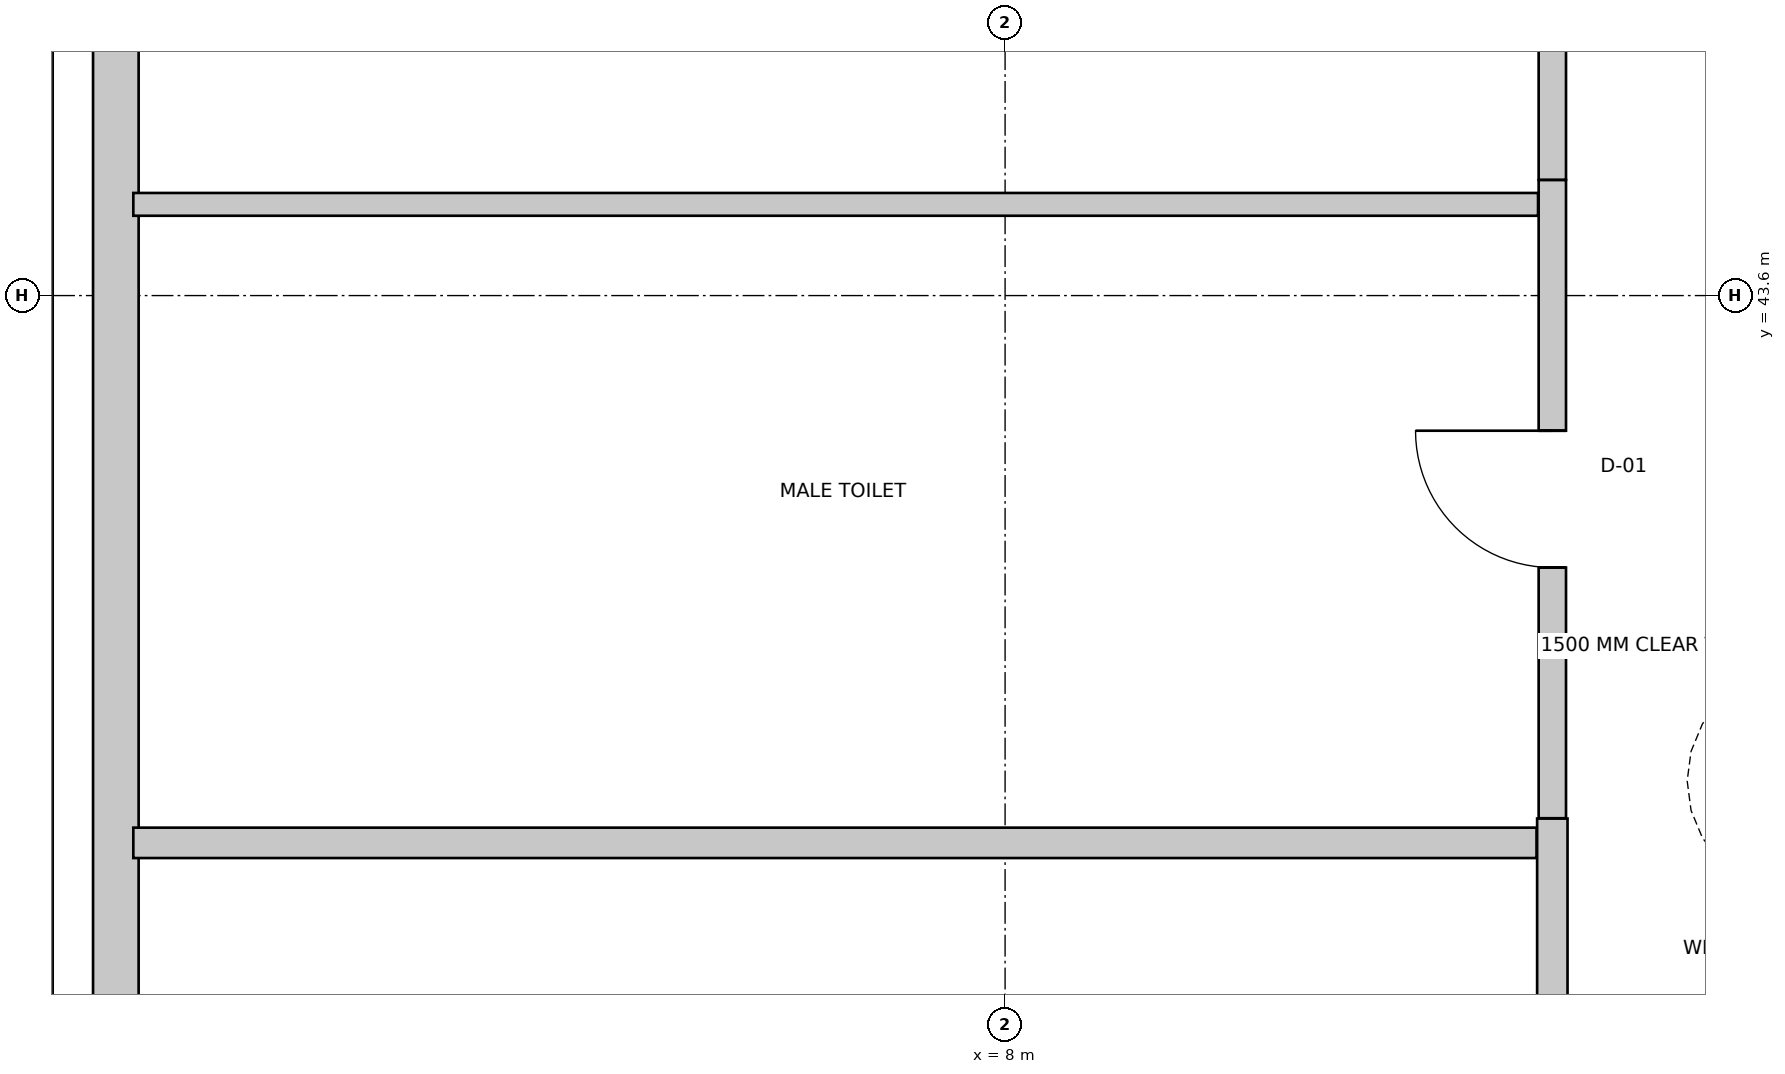
"""IFC4 building model, lengths in metres.
Left out: names, types, materials, properties, quantities, classifications, styles, units other than length and angle.
Written with IfcOpenShell. Run it as: python <this file> out.ifc"""

import sys

from ifc_helpers import new_model, si_unit, direction, frame, frame_2d, origin, place, context, subcontext, project, spatial, rectangle, extrude, source, transform, mapped, element, fill, save


model = new_model("IFC4")
c1 = context("Model", 3, precision=1e-05, world=origin(), true_north=direction((0.0, 1.0)))
c2 = subcontext(c1, "Body", "Model", "MODEL_VIEW")
j1 = project(units=[si_unit("LENGTHUNIT", "METRE"), si_unit("PLANEANGLEUNIT", "RADIAN")], contexts=[c1])
p1 = place(None, origin())
s1 = spatial("IfcSite", under=j1, at=p1, CompositionType="ELEMENT")
p2 = place(p1, origin())
s2 = spatial("IfcBuilding", under=s1, at=p2, CompositionType="ELEMENT")
p3 = place(p2, origin())
s3 = spatial("IfcBuildingStorey", under=s2, at=p3, CompositionType="ELEMENT", Elevation=0.0)
p4 = place(p3, frame((2.15, 4.112, 0.0), z_axis=(0.0, 0.0, 1.0), x_axis=(0.0, 1.0, 0.0)))
e1 = element("IfcWall", 1, at=p4, inside=s3, PredefinedType="SOLIDWALL", context=c2, shape_type="SweptSolid", body=[
    extrude(rectangle(XDim=45.431, YDim=0.3, at=frame_2d((22.715, 0.0))), origin(), (0.0, 0.0, 1.0), 5.7),
])
m1 = source(origin(), c2, "Body", "SweptSolid", [
    extrude(rectangle(XDim=2.4, YDim=2.8, at=frame_2d((1.2, 1.4))), frame((0.0, 0.16, 0.0), z_axis=(0.0, -1.0, 0.0), x_axis=(1.0, 0.0, 0.0)), (0.0, 0.0, 1.0), 0.32),
])
p5 = place(p4, frame((19.231, 0.0, 0.0)))
e2 = element("IfcOpeningElement", 2, at=p5, cuts=e1, PredefinedType="OPENING", context=c2, shape_type="MappedRepresentation", body=[
    mapped(m1, transform((0.0, 0.0, 0.0), scale=1.0)),
])
p6 = place(p4, frame((12.831, 0.0, 0.0)))
e3 = element("IfcOpeningElement", 3, at=p6, cuts=e1, PredefinedType="OPENING", context=c2, shape_type="MappedRepresentation", body=[
    mapped(m1, transform((0.0, 0.0, 0.0), scale=1.0)),
])
m2 = source(origin(), c2, "Body", "SweptSolid", [
    extrude(rectangle(XDim=1.8, YDim=2.4, at=frame_2d((0.9, 1.2))), frame((0.0, 0.16, 0.0), z_axis=(0.0, -1.0, 0.0), x_axis=(1.0, 0.0, 0.0)), (0.0, 0.0, 1.0), 0.32),
])
p7 = place(p4, frame((4.131, 0.0, 0.0)))
e4 = element("IfcOpeningElement", 4, at=p7, cuts=e1, PredefinedType="OPENING", context=c2, shape_type="MappedRepresentation", body=[
    mapped(m2, transform((0.0, 0.0, 0.0), scale=1.0)),
])
p8 = place(p3, frame((11.6, 33.444, 0.0), z_axis=(0.0, 0.0, 1.0), x_axis=(0.0, 1.0, 0.0)))
e5 = element("IfcWall", 5, at=p8, inside=s3, PredefinedType="SOLIDWALL", context=c2, shape_type="SweptSolid", body=[
    extrude(rectangle(XDim=6.716, YDim=0.2, at=frame_2d((3.358, 0.0))), origin(), (0.0, 0.0, 1.0), 4.742),
])
m3 = source(origin(), c2, "Body", "SweptSolid", [
    extrude(rectangle(XDim=1.1, YDim=2.15, at=frame_2d((0.55, 1.075))), frame((0.0, 0.11, 0.0), z_axis=(0.0, -1.0, 0.0), x_axis=(1.0, 0.0, 0.0)), (0.0, 0.0, 1.0), 0.22),
])
p9 = place(p8, frame((2.808, 0.0, 0.0)))
e6 = element("IfcOpeningElement", 6, at=p9, cuts=e5, PredefinedType="OPENING", context=c2, shape_type="MappedRepresentation", body=[
    mapped(m3, transform((0.0, 0.0, 0.0), scale=1.0)),
])
p10 = place(p3, frame((11.6, 40.162, 0.0), z_axis=(0.0, 0.0, 1.0), x_axis=(0.0, 1.0, 0.0)))
e7 = element("IfcWall", 7, at=p10, inside=s3, PredefinedType="PARTITIONING", context=c2, shape_type="SweptSolid", body=[
    extrude(rectangle(XDim=4.198, YDim=0.18, at=frame_2d((2.099, 0.0))), origin(), (0.0, 0.0, 1.0), 4.742),
])
m4 = source(origin(), c2, "Body", "SweptSolid", [
    extrude(rectangle(XDim=0.9, YDim=2.15, at=frame_2d((0.45, 1.075))), frame((0.0, 0.1, 0.0), z_axis=(0.0, -1.0, 0.0), x_axis=(1.0, 0.0, 0.0)), (0.0, 0.0, 1.0), 0.2),
])
p11 = place(p10, frame((1.649, 0.0, 0.0)))
e8 = element("IfcOpeningElement", 8, at=p11, cuts=e7, PredefinedType="OPENING", context=c2, shape_type="MappedRepresentation", body=[
    mapped(m4, transform((0.0, 0.0, 0.0), scale=1.0)),
])
p12 = place(p3, frame((11.6, 44.362, 0.0), z_axis=(0.0, 0.0, 1.0), x_axis=(0.0, 1.0, 0.0)))
e9 = element("IfcWall", 9, at=p12, inside=s3, PredefinedType="PARTITIONING", context=c2, shape_type="SweptSolid", body=[
    extrude(rectangle(XDim=3.998, YDim=0.18, at=frame_2d((1.999, 0.0))), origin(), (0.0, 0.0, 1.0), 5.7),
])
p13 = place(p12, frame((1.489, 0.0, 0.0)))
e10 = element("IfcOpeningElement", 10, at=p13, cuts=e9, PredefinedType="OPENING", context=c2, shape_type="MappedRepresentation", body=[
    mapped(m4, transform((0.0, 0.0, 0.0), scale=1.0)),
])
p14 = place(p3, frame((2.265, 40.0, 0.0), z_axis=(0.0, 0.0, 1.0), x_axis=(1.0, 0.0, 0.0)))
e11 = element("IfcWall", 11, at=p14, inside=s3, PredefinedType="SOLIDWALL", context=c2, shape_type="SweptSolid", body=[
    extrude(rectangle(XDim=9.231, YDim=0.2, at=frame_2d((4.616, 0.0))), origin(), (0.0, 0.0, 1.0), 4.742),
])
p15 = place(p3, frame((2.265, 44.2, 0.0), z_axis=(0.0, 0.0, 1.0), x_axis=(1.0, 0.0, 0.0)))
e12 = element("IfcWall", 12, at=p15, inside=s3, PredefinedType="PARTITIONING", context=c2, shape_type="SweptSolid", body=[
    extrude(rectangle(XDim=9.241, YDim=0.15, at=frame_2d((4.621, 0.0))), origin(), (0.0, 0.0, 1.0), 4.742),
])
m5 = source(origin(), c2, "Body", "SweptSolid", [
    extrude(rectangle(XDim=0.9, YDim=2.15, at=frame_2d((0.45, 1.075))), frame((0.0, 0.025, 0.0), z_axis=(0.0, -1.0, 0.0), x_axis=(1.0, 0.0, 0.0)), (0.0, 0.0, 1.0), 0.05),
])
p16 = place(p11, origin())
e13 = element("IfcDoor", 13, at=p16, inside=s3, OperationType="SINGLE_SWING_RIGHT", PredefinedType="DOOR", context=c2, shape_type="MappedRepresentation", body=[
    mapped(m5, transform((0.0, 0.0, 0.0), scale=1.0)),
])
fill(e8, e13)
save(model, sys.argv[1])
